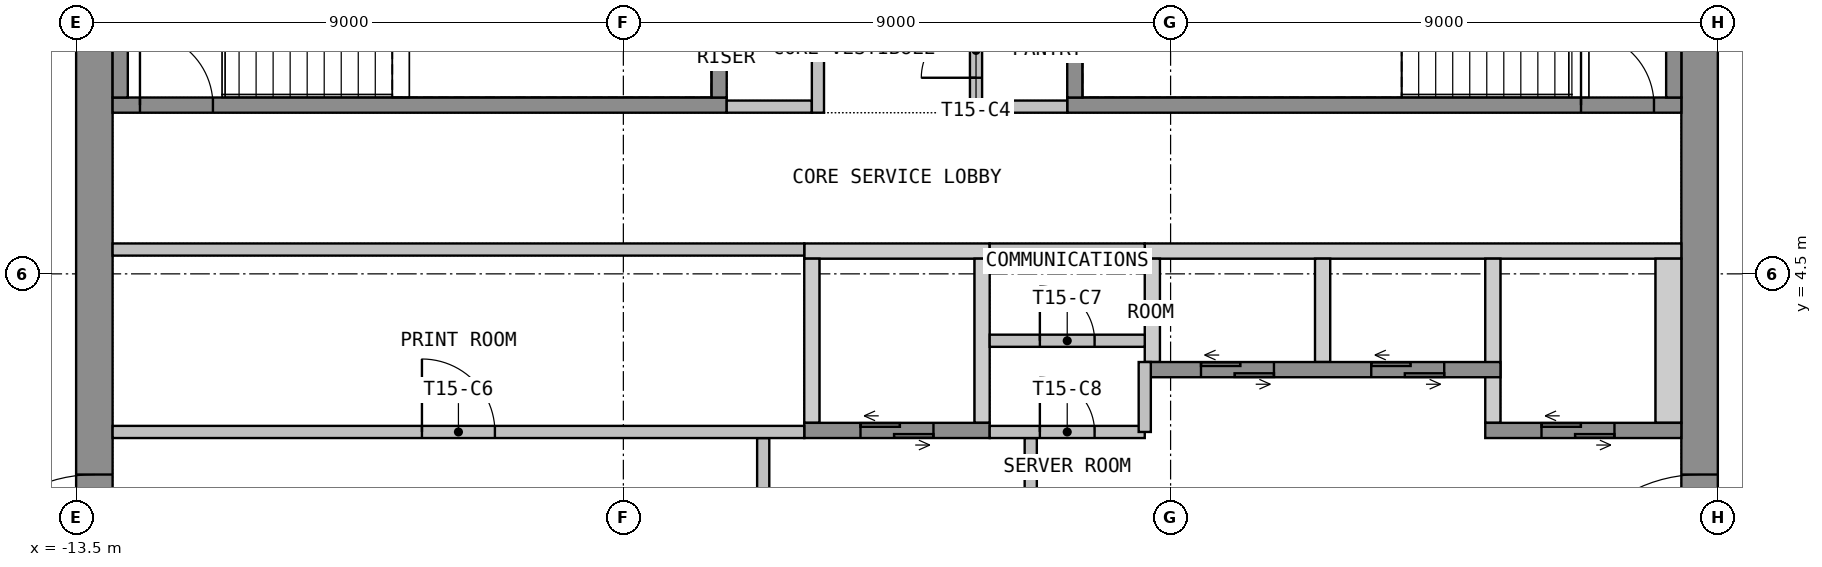
"""IFC4 building model, lengths in metres.
Left out: names, types, materials, properties, quantities, classifications, styles, units other than length and angle.
Written with IfcOpenShell. Run it as: python <this file> out.ifc"""

import sys

from ifc_helpers import new_model, si_unit, direction, frame, frame_2d, origin, place, context, subcontext, project, spatial, polyline, rectangle, outline, extrude, element, fill, save


model = new_model("IFC4")
c1 = context("Model", 3, precision=1e-05, world=origin(), true_north=direction((0.0, 1.0)))
c2 = subcontext(c1, "Body", "Model", "MODEL_VIEW")
j1 = project(units=[si_unit("LENGTHUNIT", "METRE"), si_unit("PLANEANGLEUNIT", "RADIAN")], contexts=[c1])
p1 = place(None, origin())
s1 = spatial("IfcSite", under=j1, at=p1, CompositionType="ELEMENT")
p2 = place(p1, origin())
s2 = spatial("IfcBuilding", under=s1, at=p2, CompositionType="ELEMENT")
p3 = place(p2, frame((0.0, 0.0, 207.3)))
s3 = spatial("IfcBuildingStorey", under=s2, at=p3, CompositionType="ELEMENT", Elevation=207.3)
p4 = place(p3, frame((-13.2, -10.65, 0.0), z_axis=(0.0, 0.0, 1.0), x_axis=(0.0, 1.0, 0.0)))
e1 = element("IfcWall", 1, at=p4, inside=s3, PredefinedType="SHEAR", context=c2, shape_type="SweptSolid", body=[
    extrude(rectangle(XDim=21.3, YDim=0.6, at=frame_2d((10.65, 0.0))), origin(), (0.0, 0.0, 1.0), 3.55),
])
p5 = place(p4, frame((9.45, 0.0, 0.0)))
e2 = element("IfcOpeningElement", 2, at=p5, cuts=e1, PredefinedType="OPENING", context=c2, shape_type="SweptSolid", body=[
    extrude(rectangle(XDim=2.4, YDim=2.1, at=frame_2d((1.2, 1.05))), frame((0.0, 0.31, 0.0), z_axis=(0.0, -1.0, 0.0), x_axis=(1.0, 0.0, 0.0)), (0.0, 0.0, 1.0), 0.62),
])
p6 = place(p3, frame((13.2, -10.65, 0.0), z_axis=(0.0, 0.0, 1.0), x_axis=(0.0, 1.0, 0.0)))
e3 = element("IfcWall", 3, at=p6, inside=s3, PredefinedType="SHEAR", context=c2, shape_type="SweptSolid", body=[
    extrude(rectangle(XDim=21.3, YDim=0.6, at=frame_2d((10.65, 0.0))), origin(), (0.0, 0.0, 1.0), 3.55),
])
p7 = place(p6, frame((9.45, 0.0, 0.0)))
e4 = element("IfcOpeningElement", 4, at=p7, cuts=e3, PredefinedType="OPENING", context=c2, shape_type="SweptSolid", body=[
    extrude(rectangle(XDim=2.4, YDim=2.1, at=frame_2d((1.2, 1.05))), frame((0.0, 0.31, 0.0), z_axis=(0.0, -1.0, 0.0), x_axis=(1.0, 0.0, 0.0)), (0.0, 0.0, 1.0), 0.62),
])
p8 = place(p3, origin())
e5 = element("IfcWall", 5, at=p8, inside=s3, PredefinedType="SHEAR", context=c2, shape_type="SweptSolid", body=[
    extrude(outline(polyline([(-1.525, 4.75), (1.525, 4.75), (1.525, 5.0), (-1.525, 5.0), (-1.525, 4.75)])), origin(), (0.0, 0.0, 1.0), 3.55),
])
p9 = place(p3, origin())
e6 = element("IfcWall", 6, at=p9, inside=s3, PredefinedType="SHEAR", context=c2, shape_type="SweptSolid", body=[
    extrude(outline(polyline([(4.075, 4.75), (12.9, 4.75), (12.9, 5.0), (4.075, 5.0), (4.075, 4.75)])), origin(), (0.0, 0.0, 1.0), 3.55),
])
p10 = place(p3, origin())
e7 = element("IfcWall", 7, at=p10, inside=s3, PredefinedType="SHEAR", context=c2, shape_type="SweptSolid", body=[
    extrude(outline(polyline([(-1.525, 2.05), (-1.275, 2.05), (-1.275, 4.75), (-1.525, 4.75), (-1.525, 2.05)])), origin(), (0.0, 0.0, 1.0), 3.55),
])
p11 = place(p3, origin())
e8 = element("IfcWall", 8, at=p11, inside=s3, PredefinedType="SHEAR", context=c2, shape_type="SweptSolid", body=[
    extrude(outline(polyline([(1.275, 2.05), (1.525, 2.05), (1.525, 4.75), (1.275, 4.75), (1.275, 2.05)])), origin(), (0.0, 0.0, 1.0), 3.55),
])
p12 = place(p3, origin())
e9 = element("IfcWall", 9, at=p12, inside=s3, PredefinedType="SHEAR", context=c2, shape_type="SweptSolid", body=[
    extrude(outline(polyline([(9.675, 2.05), (9.925, 2.05), (9.925, 4.75), (9.675, 4.75), (9.675, 2.05)])), origin(), (0.0, 0.0, 1.0), 3.55),
])
p13 = place(p3, origin())
e10 = element("IfcWall", 10, at=p13, inside=s3, PredefinedType="SHEAR", context=c2, shape_type="SweptSolid", body=[
    extrude(outline(polyline([(12.475, 2.05), (12.9, 2.05), (12.9, 4.75), (12.475, 4.75), (12.475, 2.05)])), origin(), (0.0, 0.0, 1.0), 3.55),
])
p14 = place(p3, origin())
e11 = element("IfcWall", 11, at=p14, inside=s3, PredefinedType="SHEAR", context=c2, shape_type="SweptSolid", body=[
    extrude(outline(polyline([(4.075, 3.05), (4.325, 3.05), (4.325, 4.75), (4.075, 4.75), (4.075, 3.05)])), origin(), (0.0, 0.0, 1.0), 3.55),
])
p15 = place(p3, origin())
e12 = element("IfcWall", 12, at=p15, inside=s3, PredefinedType="SHEAR", context=c2, shape_type="SweptSolid", body=[
    extrude(outline(polyline([(6.875, 3.05), (7.125, 3.05), (7.125, 4.75), (6.875, 4.75), (6.875, 3.05)])), origin(), (0.0, 0.0, 1.0), 3.55),
])
p16 = place(p3, frame((-1.525, 1.925, 0.0), z_axis=(0.0, 0.0, 1.0), x_axis=(1.0, 0.0, 0.0)))
e13 = element("IfcWall", 13, at=p16, inside=s3, PredefinedType="SHEAR", context=c2, shape_type="SweptSolid", body=[
    extrude(rectangle(XDim=3.05, YDim=0.25, at=frame_2d((1.525, 0.0))), origin(), (0.0, 0.0, 1.0), 3.55),
])
p17 = place(p16, frame((0.925, 0.0, 0.0)))
e14 = element("IfcOpeningElement", 14, at=p17, cuts=e13, PredefinedType="OPENING", context=c2, shape_type="SweptSolid", body=[
    extrude(rectangle(XDim=1.2, YDim=2.1, at=frame_2d((0.6, 1.05))), frame((0.0, 0.135, 0.0), z_axis=(0.0, -1.0, 0.0), x_axis=(1.0, 0.0, 0.0)), (0.0, 0.0, 1.0), 0.27),
])
p18 = place(p3, frame((4.075, 2.925, 0.0), z_axis=(0.0, 0.0, 1.0), x_axis=(1.0, 0.0, 0.0)))
e15 = element("IfcWall", 15, at=p18, inside=s3, PredefinedType="SHEAR", context=c2, shape_type="SweptSolid", body=[
    extrude(rectangle(XDim=5.85, YDim=0.25, at=frame_2d((2.925, 0.0))), origin(), (0.0, 0.0, 1.0), 3.55),
])
p19 = place(p18, frame((0.925, 0.0, 0.0)))
e16 = element("IfcOpeningElement", 16, at=p19, cuts=e15, PredefinedType="OPENING", context=c2, shape_type="SweptSolid", body=[
    extrude(rectangle(XDim=1.2, YDim=2.1, at=frame_2d((0.6, 1.05))), frame((0.0, 0.135, 0.0), z_axis=(0.0, -1.0, 0.0), x_axis=(1.0, 0.0, 0.0)), (0.0, 0.0, 1.0), 0.27),
])
p20 = place(p18, frame((3.725, 0.0, 0.0)))
e17 = element("IfcOpeningElement", 17, at=p20, cuts=e15, PredefinedType="OPENING", context=c2, shape_type="SweptSolid", body=[
    extrude(rectangle(XDim=1.2, YDim=2.1, at=frame_2d((0.6, 1.05))), frame((0.0, 0.135, 0.0), z_axis=(0.0, -1.0, 0.0), x_axis=(1.0, 0.0, 0.0)), (0.0, 0.0, 1.0), 0.27),
])
p21 = place(p3, frame((9.675, 1.925, 0.0), z_axis=(0.0, 0.0, 1.0), x_axis=(1.0, 0.0, 0.0)))
e18 = element("IfcWall", 18, at=p21, inside=s3, PredefinedType="SHEAR", context=c2, shape_type="SweptSolid", body=[
    extrude(rectangle(XDim=3.225, YDim=0.25, at=frame_2d((1.612, 0.0))), origin(), (0.0, 0.0, 1.0), 3.55),
])
p22 = place(p21, frame((0.925, 0.0, 0.0)))
e19 = element("IfcOpeningElement", 19, at=p22, cuts=e18, PredefinedType="OPENING", context=c2, shape_type="SweptSolid", body=[
    extrude(rectangle(XDim=1.2, YDim=2.1, at=frame_2d((0.6, 1.05))), frame((0.0, 0.135, 0.0), z_axis=(0.0, -1.0, 0.0), x_axis=(1.0, 0.0, 0.0)), (0.0, 0.0, 1.0), 0.27),
])
p23 = place(p3, frame((-2.2, -1.8, 0.0), z_axis=(0.0, 0.0, 1.0), x_axis=(0.0, 1.0, 0.0)))
e20 = element("IfcWall", 20, at=p23, inside=s3, PredefinedType="PARTITIONING", context=c2, shape_type="SweptSolid", body=[
    extrude(rectangle(XDim=3.6, YDim=0.2, at=frame_2d((1.8, 0.0))), origin(), (0.0, 0.0, 1.0), 3.55),
])
p24 = place(p23, frame((1.2, 0.0, 0.0)))
e21 = element("IfcOpeningElement", 21, at=p24, cuts=e20, PredefinedType="OPENING", context=c2, shape_type="SweptSolid", body=[
    extrude(rectangle(XDim=1.2, YDim=2.1, at=frame_2d((0.6, 1.05))), frame((0.0, 0.11, 0.0), z_axis=(0.0, -1.0, 0.0), x_axis=(1.0, 0.0, 0.0)), (0.0, 0.0, 1.0), 0.22),
])
p25 = place(p3, frame((2.2, -1.8, 0.0), z_axis=(0.0, 0.0, 1.0), x_axis=(0.0, 1.0, 0.0)))
e22 = element("IfcWall", 22, at=p25, inside=s3, PredefinedType="PARTITIONING", context=c2, shape_type="SweptSolid", body=[
    extrude(rectangle(XDim=3.6, YDim=0.2, at=frame_2d((1.8, 0.0))), origin(), (0.0, 0.0, 1.0), 3.55),
])
p26 = place(p25, frame((1.2, 0.0, 0.0)))
e23 = element("IfcOpeningElement", 23, at=p26, cuts=e22, PredefinedType="OPENING", context=c2, shape_type="SweptSolid", body=[
    extrude(rectangle(XDim=1.2, YDim=2.1, at=frame_2d((0.6, 1.05))), frame((0.0, 0.11, 0.0), z_axis=(0.0, -1.0, 0.0), x_axis=(1.0, 0.0, 0.0)), (0.0, 0.0, 1.0), 0.22),
])
p27 = place(p3, frame((-12.9, 7.275, 0.0), z_axis=(0.0, 0.0, 1.0), x_axis=(1.0, 0.0, 0.0)))
e24 = element("IfcWall", 24, at=p27, inside=s3, PredefinedType="SHEAR", context=c2, shape_type="SweptSolid", body=[
    extrude(rectangle(XDim=10.1, YDim=0.25, at=frame_2d((5.05, 0.0))), origin(), (0.0, 0.0, 1.0), 3.55),
])
p28 = place(p27, frame((0.45, 0.0, 0.0)))
e25 = element("IfcOpeningElement", 25, at=p28, cuts=e24, PredefinedType="OPENING", context=c2, shape_type="SweptSolid", body=[
    extrude(rectangle(XDim=1.2, YDim=2.1, at=frame_2d((0.6, 1.05))), frame((0.0, 0.135, 0.0), z_axis=(0.0, -1.0, 0.0), x_axis=(1.0, 0.0, 0.0)), (0.0, 0.0, 1.0), 0.27),
])
for number, where, z_axis, x_axis in (
    (26, (-12.775, 7.4, 0.0), (0.0, 0.0, 1.0), (0.0, 1.0, 0.0)),
    (27, (-2.925, 7.4, 0.0), (0.0, 0.0, 1.0), (0.0, 1.0, 0.0)),
):
    element("IfcWall", number, at=place(p3, frame(where, z_axis=z_axis, x_axis=x_axis)), inside=s3, PredefinedType="SHEAR", context=c2, shape_type="SweptSolid", body=[
        extrude(rectangle(XDim=3.25, YDim=0.25, at=frame_2d((1.625, 0.0))), origin(), (0.0, 0.0, 1.0), 3.55),
    ])
p29 = place(p3, frame((2.8, 7.275, 0.0), z_axis=(0.0, 0.0, 1.0), x_axis=(1.0, 0.0, 0.0)))
e28 = element("IfcWall", 28, at=p29, inside=s3, PredefinedType="SHEAR", context=c2, shape_type="SweptSolid", body=[
    extrude(rectangle(XDim=10.1, YDim=0.25, at=frame_2d((5.05, 0.0))), origin(), (0.0, 0.0, 1.0), 3.55),
])
p30 = place(p29, frame((8.45, 0.0, 0.0)))
e29 = element("IfcOpeningElement", 29, at=p30, cuts=e28, PredefinedType="OPENING", context=c2, shape_type="SweptSolid", body=[
    extrude(rectangle(XDim=1.2, YDim=2.1, at=frame_2d((0.6, 1.05))), frame((0.0, 0.135, 0.0), z_axis=(0.0, -1.0, 0.0), x_axis=(1.0, 0.0, 0.0)), (0.0, 0.0, 1.0), 0.27),
])
for number, where, z_axis, x_axis in (
    (30, (2.925, 7.4, 0.0), (0.0, 0.0, 1.0), (0.0, 1.0, 0.0)),
    (31, (12.775, 7.4, 0.0), (0.0, 0.0, 1.0), (0.0, 1.0, 0.0)),
):
    element("IfcWall", number, at=place(p3, frame(where, z_axis=z_axis, x_axis=x_axis)), inside=s3, PredefinedType="SHEAR", context=c2, shape_type="SweptSolid", body=[
        extrude(rectangle(XDim=3.25, YDim=0.25, at=frame_2d((1.625, 0.0))), origin(), (0.0, 0.0, 1.0), 3.55),
    ])
for number, where, z_axis, x_axis in (
    (32, (-2.8, 7.25, 0.0), (0.0, 0.0, 1.0), (1.0, 0.0, 0.0)),
    (33, (1.4, 7.25, 0.0), (0.0, 0.0, 1.0), (1.0, 0.0, 0.0)),
):
    element("IfcWall", number, at=place(p3, frame(where, z_axis=z_axis, x_axis=x_axis)), inside=s3, PredefinedType="PARTITIONING", context=c2, shape_type="SweptSolid", body=[
        extrude(rectangle(XDim=1.4, YDim=0.2, at=frame_2d((0.7, 0.0))), origin(), (0.0, 0.0, 1.0), 3.55),
    ])
p31 = place(p3, frame((-1.3, 7.15, 0.0), z_axis=(0.0, 0.0, 1.0), x_axis=(0.0, 1.0, 0.0)))
e34 = element("IfcWall", 34, at=p31, inside=s3, PredefinedType="PARTITIONING", context=c2, shape_type="SweptSolid", body=[
    extrude(rectangle(XDim=3.5, YDim=0.2, at=frame_2d((1.75, 0.0))), origin(), (0.0, 0.0, 1.0), 3.55),
])
p32 = place(p31, frame((1.4, 0.0, 0.0)))
e35 = element("IfcOpeningElement", 35, at=p32, cuts=e34, PredefinedType="OPENING", context=c2, shape_type="SweptSolid", body=[
    extrude(rectangle(XDim=0.9, YDim=2.1, at=frame_2d((0.45, 1.05))), frame((0.0, 0.11, 0.0), z_axis=(0.0, -1.0, 0.0), x_axis=(1.0, 0.0, 0.0)), (0.0, 0.0, 1.0), 0.22),
])
p33 = place(p3, frame((1.3, 7.15, 0.0), z_axis=(0.0, 0.0, 1.0), x_axis=(0.0, 1.0, 0.0)))
e36 = element("IfcWall", 36, at=p33, inside=s3, PredefinedType="PARTITIONING", context=c2, shape_type="SweptSolid", body=[
    extrude(rectangle(XDim=3.5, YDim=0.2, at=frame_2d((1.75, 0.0))), origin(), (0.0, 0.0, 1.0), 3.55),
])
p34 = place(p33, frame((0.575, 0.0, 0.0)))
e37 = element("IfcOpeningElement", 37, at=p34, cuts=e36, PredefinedType="OPENING", context=c2, shape_type="SweptSolid", body=[
    extrude(rectangle(XDim=0.9, YDim=2.1, at=frame_2d((0.45, 1.05))), frame((0.0, 0.11, 0.0), z_axis=(0.0, -1.0, 0.0), x_axis=(1.0, 0.0, 0.0)), (0.0, 0.0, 1.0), 0.22),
])
p35 = place(p33, frame((2.225, 0.0, 0.0)))
e38 = element("IfcOpeningElement", 38, at=p35, cuts=e36, PredefinedType="OPENING", context=c2, shape_type="SweptSolid", body=[
    extrude(rectangle(XDim=0.9, YDim=2.1, at=frame_2d((0.45, 1.05))), frame((0.0, 0.11, 0.0), z_axis=(0.0, -1.0, 0.0), x_axis=(1.0, 0.0, 0.0)), (0.0, 0.0, 1.0), 0.22),
])
p36 = place(p3, frame((-12.9, 1.9, 0.0), z_axis=(0.0, 0.0, 1.0), x_axis=(1.0, 0.0, 0.0)))
e39 = element("IfcWall", 39, at=p36, inside=s3, PredefinedType="PARTITIONING", context=c2, shape_type="SweptSolid", body=[
    extrude(rectangle(XDim=11.375, YDim=0.2, at=frame_2d((5.688, 0.0))), origin(), (0.0, 0.0, 1.0), 3.55),
])
p37 = place(p36, frame((5.087, 0.0, 0.0)))
e40 = element("IfcOpeningElement", 40, at=p37, cuts=e39, PredefinedType="OPENING", context=c2, shape_type="SweptSolid", body=[
    extrude(rectangle(XDim=1.2, YDim=2.1, at=frame_2d((0.6, 1.05))), frame((0.0, 0.11, 0.0), z_axis=(0.0, -1.0, 0.0), x_axis=(1.0, 0.0, 0.0)), (0.0, 0.0, 1.0), 0.22),
])
p38 = place(p3, frame((-12.9, 4.9, 0.0), z_axis=(0.0, 0.0, 1.0), x_axis=(1.0, 0.0, 0.0)))
e41 = element("IfcWall", 41, at=p38, inside=s3, PredefinedType="PARTITIONING", context=c2, shape_type="SweptSolid", body=[
    extrude(rectangle(XDim=11.375, YDim=0.2, at=frame_2d((5.688, 0.0))), origin(), (0.0, 0.0, 1.0), 3.55),
])
p39 = place(p3, frame((1.525, 3.4, 0.0), z_axis=(0.0, 0.0, 1.0), x_axis=(1.0, 0.0, 0.0)))
e42 = element("IfcWall", 42, at=p39, inside=s3, PredefinedType="PARTITIONING", context=c2, shape_type="SweptSolid", body=[
    extrude(rectangle(XDim=2.55, YDim=0.2, at=frame_2d((1.275, 0.0))), origin(), (0.0, 0.0, 1.0), 3.55),
])
p40 = place(p39, frame((0.825, 0.0, 0.0)))
e43 = element("IfcOpeningElement", 43, at=p40, cuts=e42, PredefinedType="OPENING", context=c2, shape_type="SweptSolid", body=[
    extrude(rectangle(XDim=0.9, YDim=2.1, at=frame_2d((0.45, 1.05))), frame((0.0, 0.11, 0.0), z_axis=(0.0, -1.0, 0.0), x_axis=(1.0, 0.0, 0.0)), (0.0, 0.0, 1.0), 0.22),
])
p41 = place(p3, frame((1.525, 1.9, 0.0), z_axis=(0.0, 0.0, 1.0), x_axis=(1.0, 0.0, 0.0)))
e44 = element("IfcWall", 44, at=p41, inside=s3, PredefinedType="PARTITIONING", context=c2, shape_type="SweptSolid", body=[
    extrude(rectangle(XDim=2.55, YDim=0.2, at=frame_2d((1.275, 0.0))), origin(), (0.0, 0.0, 1.0), 3.55),
])
p42 = place(p41, frame((0.825, 0.0, 0.0)))
e45 = element("IfcOpeningElement", 45, at=p42, cuts=e44, PredefinedType="OPENING", context=c2, shape_type="SweptSolid", body=[
    extrude(rectangle(XDim=0.9, YDim=2.1, at=frame_2d((0.45, 1.05))), frame((0.0, 0.11, 0.0), z_axis=(0.0, -1.0, 0.0), x_axis=(1.0, 0.0, 0.0)), (0.0, 0.0, 1.0), 0.22),
])
p43 = place(p3, frame((1.525, 4.9, 0.0), z_axis=(0.0, 0.0, 1.0), x_axis=(1.0, 0.0, 0.0)))
e46 = element("IfcWall", 46, at=p43, inside=s3, PredefinedType="PARTITIONING", context=c2, shape_type="SweptSolid", body=[
    extrude(rectangle(XDim=2.55, YDim=0.2, at=frame_2d((1.275, 0.0))), origin(), (0.0, 0.0, 1.0), 3.55),
])
p44 = place(p3, frame((4.075, 1.9, 0.0), z_axis=(0.0, 0.0, 1.0), x_axis=(0.0, 1.0, 0.0)))
e47 = element("IfcWall", 47, at=p44, inside=s3, PredefinedType="PARTITIONING", context=c2, shape_type="SweptSolid", body=[
    extrude(rectangle(XDim=1.15, YDim=0.2, at=frame_2d((0.575, 0.0))), origin(), (0.0, 0.0, 1.0), 3.55),
])
p45 = place(p5, origin())
e48 = element("IfcDoor", 48, at=p45, inside=s3, OperationType="DOUBLE_DOOR_DOUBLE_SWING", PredefinedType="DOOR", context=c2, shape_type="SweptSolid", body=[
    extrude(rectangle(XDim=2.4, YDim=2.1, at=frame_2d((1.2, 1.05))), frame((0.0, 0.025, 0.0), z_axis=(0.0, -1.0, 0.0), x_axis=(1.0, 0.0, 0.0)), (0.0, 0.0, 1.0), 0.05),
])
fill(e2, e48)
p46 = place(p7, origin())
e49 = element("IfcDoor", 49, at=p46, inside=s3, OperationType="DOUBLE_DOOR_DOUBLE_SWING", PredefinedType="DOOR", context=c2, shape_type="SweptSolid", body=[
    extrude(rectangle(XDim=2.4, YDim=2.1, at=frame_2d((1.2, 1.05))), frame((0.0, 0.025, 0.0), z_axis=(0.0, -1.0, 0.0), x_axis=(1.0, 0.0, 0.0)), (0.0, 0.0, 1.0), 0.05),
])
fill(e4, e49)
p47 = place(p17, origin())
e50 = element("IfcDoor", 50, at=p47, inside=s3, OperationType="DOUBLE_DOOR_SLIDING", PredefinedType="DOOR", context=c2, shape_type="SweptSolid", body=[
    extrude(rectangle(XDim=1.2, YDim=2.1, at=frame_2d((0.6, 1.05))), frame((0.0, 0.025, 0.0), z_axis=(0.0, -1.0, 0.0), x_axis=(1.0, 0.0, 0.0)), (0.0, 0.0, 1.0), 0.05),
])
fill(e14, e50)
p48 = place(p19, origin())
e51 = element("IfcDoor", 51, at=p48, inside=s3, OperationType="DOUBLE_DOOR_SLIDING", PredefinedType="DOOR", context=c2, shape_type="SweptSolid", body=[
    extrude(rectangle(XDim=1.2, YDim=2.1, at=frame_2d((0.6, 1.05))), frame((0.0, 0.025, 0.0), z_axis=(0.0, -1.0, 0.0), x_axis=(1.0, 0.0, 0.0)), (0.0, 0.0, 1.0), 0.05),
])
fill(e16, e51)
p49 = place(p20, origin())
e52 = element("IfcDoor", 52, at=p49, inside=s3, OperationType="DOUBLE_DOOR_SLIDING", PredefinedType="DOOR", context=c2, shape_type="SweptSolid", body=[
    extrude(rectangle(XDim=1.2, YDim=2.1, at=frame_2d((0.6, 1.05))), frame((0.0, 0.025, 0.0), z_axis=(0.0, -1.0, 0.0), x_axis=(1.0, 0.0, 0.0)), (0.0, 0.0, 1.0), 0.05),
])
fill(e17, e52)
p50 = place(p22, origin())
e53 = element("IfcDoor", 53, at=p50, inside=s3, OperationType="DOUBLE_DOOR_SLIDING", PredefinedType="DOOR", context=c2, shape_type="SweptSolid", body=[
    extrude(rectangle(XDim=1.2, YDim=2.1, at=frame_2d((0.6, 1.05))), frame((0.0, 0.025, 0.0), z_axis=(0.0, -1.0, 0.0), x_axis=(1.0, 0.0, 0.0)), (0.0, 0.0, 1.0), 0.05),
])
fill(e19, e53)
p51 = place(p28, origin())
e54 = element("IfcDoor", 54, at=p51, inside=s3, OperationType="SINGLE_SWING_LEFT", PredefinedType="DOOR", context=c2, shape_type="SweptSolid", body=[
    extrude(rectangle(XDim=1.2, YDim=2.1, at=frame_2d((0.6, 1.05))), frame((0.0, 0.025, 0.0), z_axis=(0.0, -1.0, 0.0), x_axis=(1.0, 0.0, 0.0)), (0.0, 0.0, 1.0), 0.05),
])
fill(e25, e54)
p52 = place(p30, origin())
e55 = element("IfcDoor", 55, at=p52, inside=s3, OperationType="SINGLE_SWING_LEFT", PredefinedType="DOOR", context=c2, shape_type="SweptSolid", body=[
    extrude(rectangle(XDim=1.2, YDim=2.1, at=frame_2d((0.6, 1.05))), frame((0.0, 0.025, 0.0), z_axis=(0.0, -1.0, 0.0), x_axis=(1.0, 0.0, 0.0)), (0.0, 0.0, 1.0), 0.05),
])
fill(e29, e55)
p53 = place(p34, origin())
e56 = element("IfcDoor", 56, at=p53, inside=s3, OperationType="SINGLE_SWING_LEFT", PredefinedType="DOOR", context=c2, shape_type="SweptSolid", body=[
    extrude(rectangle(XDim=0.9, YDim=2.1, at=frame_2d((0.45, 1.05))), frame((0.0, 0.025, 0.0), z_axis=(0.0, -1.0, 0.0), x_axis=(1.0, 0.0, 0.0)), (0.0, 0.0, 1.0), 0.05),
])
fill(e37, e56)
p54 = place(p37, origin())
e57 = element("IfcDoor", 57, at=p54, inside=s3, OperationType="SINGLE_SWING_RIGHT", PredefinedType="DOOR", context=c2, shape_type="SweptSolid", body=[
    extrude(rectangle(XDim=1.2, YDim=2.1, at=frame_2d((0.6, 1.05))), frame((0.0, 0.025, 0.0), z_axis=(0.0, -1.0, 0.0), x_axis=(1.0, 0.0, 0.0)), (0.0, 0.0, 1.0), 0.05),
])
fill(e40, e57)
p55 = place(p40, origin())
e58 = element("IfcDoor", 58, at=p55, inside=s3, OperationType="SINGLE_SWING_LEFT", PredefinedType="DOOR", context=c2, shape_type="SweptSolid", body=[
    extrude(rectangle(XDim=0.9, YDim=2.1, at=frame_2d((0.45, 1.05))), frame((0.0, 0.025, 0.0), z_axis=(0.0, -1.0, 0.0), x_axis=(1.0, 0.0, 0.0)), (0.0, 0.0, 1.0), 0.05),
])
fill(e43, e58)
p56 = place(p42, origin())
e59 = element("IfcDoor", 59, at=p56, inside=s3, OperationType="SINGLE_SWING_LEFT", PredefinedType="DOOR", context=c2, shape_type="SweptSolid", body=[
    extrude(rectangle(XDim=0.9, YDim=2.1, at=frame_2d((0.45, 1.05))), frame((0.0, 0.025, 0.0), z_axis=(0.0, -1.0, 0.0), x_axis=(1.0, 0.0, 0.0)), (0.0, 0.0, 1.0), 0.05),
])
fill(e45, e59)
save(model, sys.argv[1])
